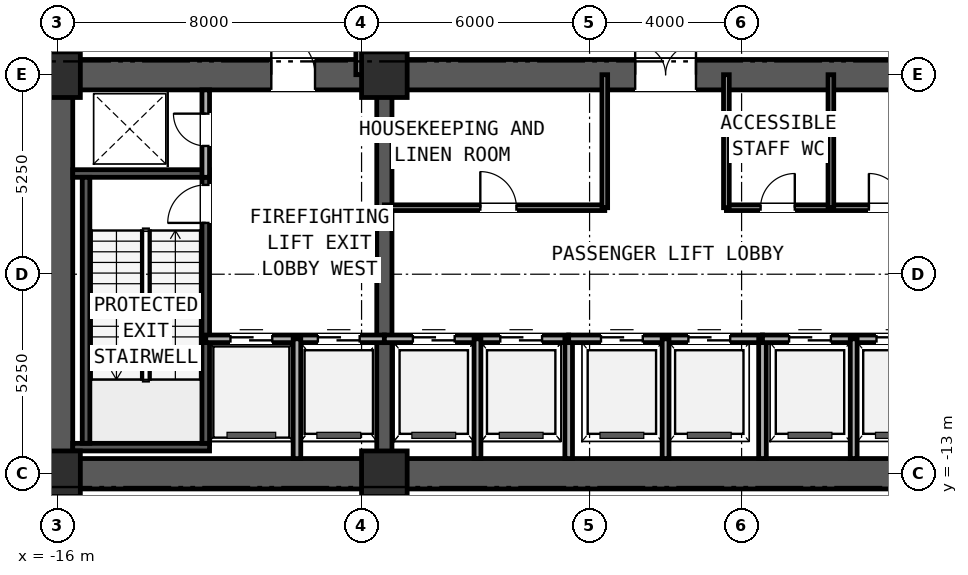
"""IFC4 building model, lengths in metres.
Left out: names, types, materials, properties, quantities, classifications, styles, units other than length and angle.
Written with IfcOpenShell. Run it as: python <this file> out.ifc"""

import sys

from ifc_helpers import new_model, si_unit, direction, frame, frame_2d, origin, origin_2d, place, context, subcontext, project, spatial, rectangle, extrude, element, fill, save


model = new_model("IFC4")
c1 = context("Model", 3, precision=1e-05, world=origin(), true_north=direction((0.0, 1.0)))
c2 = subcontext(c1, "Body", "Model", "MODEL_VIEW")
j1 = project(units=[si_unit("LENGTHUNIT", "METRE"), si_unit("PLANEANGLEUNIT", "RADIAN")], contexts=[c1])
p1 = place(None, origin())
s1 = spatial("IfcSite", under=j1, at=p1, CompositionType="ELEMENT")
p2 = place(p1, origin())
s2 = spatial("IfcBuilding", under=s1, at=p2, CompositionType="ELEMENT")
p3 = place(p2, origin())
s3 = spatial("IfcBuildingStorey", under=s2, at=p3, CompositionType="ELEMENT", Elevation=0.0)
p4 = place(p3, frame((-16.4, -13.0, 0.0), z_axis=(0.0, 0.0, 1.0), x_axis=(1.0, 0.0, 0.0)))
e1 = element("IfcWall", 1, at=p4, inside=s3, PredefinedType="SHEAR", context=c2, shape_type="SweptSolid", body=[
    extrude(rectangle(XDim=32.8, YDim=0.8, at=frame_2d((16.4, 0.0))), origin(), (0.0, 0.0, 1.0), 4.82),
])
p5 = place(p3, frame((-16.4, -2.5, 0.0), z_axis=(0.0, 0.0, 1.0), x_axis=(1.0, 0.0, 0.0)))
e2 = element("IfcWall", 2, at=p5, inside=s3, PredefinedType="SHEAR", context=c2, shape_type="SweptSolid", body=[
    extrude(rectangle(XDim=32.8, YDim=0.8, at=frame_2d((16.4, 0.0))), origin(), (0.0, 0.0, 1.0), 4.82),
])
p6 = place(p5, frame((6.025, 0.0, 0.0)))
e3 = element("IfcOpeningElement", 3, at=p6, cuts=e2, PredefinedType="OPENING", context=c2, shape_type="SweptSolid", body=[
    extrude(rectangle(XDim=1.15, YDim=2.0, at=frame_2d((0.575, 1.0))), frame((0.0, 0.41, 0.0), z_axis=(0.0, -1.0, 0.0), x_axis=(1.0, 0.0, 0.0)), (0.0, 0.0, 1.0), 0.82),
])
p7 = place(p5, frame((15.6, 0.0, 0.0)))
e4 = element("IfcOpeningElement", 4, at=p7, cuts=e2, PredefinedType="OPENING", context=c2, shape_type="SweptSolid", body=[
    extrude(rectangle(XDim=1.6, YDim=2.0, at=frame_2d((0.8, 1.0))), frame((0.0, 0.41, 0.0), z_axis=(0.0, -1.0, 0.0), x_axis=(1.0, 0.0, 0.0)), (0.0, 0.0, 1.0), 0.82),
])
p8 = place(p5, frame((25.625, 0.0, 0.0)))
e5 = element("IfcOpeningElement", 5, at=p8, cuts=e2, PredefinedType="OPENING", context=c2, shape_type="SweptSolid", body=[
    extrude(rectangle(XDim=1.15, YDim=2.0, at=frame_2d((0.575, 1.0))), frame((0.0, 0.41, 0.0), z_axis=(0.0, -1.0, 0.0), x_axis=(1.0, 0.0, 0.0)), (0.0, 0.0, 1.0), 0.82),
])
p9 = place(p3, frame((-16.0, -12.6, 0.0), z_axis=(0.0, 0.0, 1.0), x_axis=(0.0, 1.0, 0.0)))
e6 = element("IfcWall", 6, at=p9, inside=s3, PredefinedType="SHEAR", context=c2, shape_type="SweptSolid", body=[
    extrude(rectangle(XDim=9.7, YDim=0.8, at=frame_2d((4.85, 0.0))), origin(), (0.0, 0.0, 1.0), 4.82),
])
p10 = place(p3, frame((-7.4, -12.6, 0.0), z_axis=(0.0, 0.0, 1.0), x_axis=(0.0, 1.0, 0.0)))
e7 = element("IfcWall", 7, at=p10, inside=s3, PredefinedType="SHEAR", context=c2, shape_type="SweptSolid", body=[
    extrude(rectangle(XDim=9.7, YDim=0.4, at=frame_2d((4.85, 0.0))), origin(), (0.0, 0.0, 1.0), 5.1),
])
for number, where, z_axis, x_axis in (
    (8, (-15.6, -12.3, 0.0), (0.0, 0.0, 1.0), (1.0, 0.0, 0.0)),
    (9, (-15.6, -5.1, 0.0), (0.0, 0.0, 1.0), (1.0, 0.0, 0.0)),
):
    element("IfcWall", number, at=place(p3, frame(where, z_axis=z_axis, x_axis=x_axis)), inside=s3, PredefinedType="SOLIDWALL", context=c2, shape_type="SweptSolid", body=[
        extrude(rectangle(XDim=3.6, YDim=0.2, at=frame_2d((1.8, 0.0))), origin(), (0.0, 0.0, 1.0), 5.1),
    ])
p11 = place(p3, frame((-15.25, -12.2, 0.0), z_axis=(0.0, 0.0, 1.0), x_axis=(0.0, 1.0, 0.0)))
e10 = element("IfcWall", 10, at=p11, inside=s3, PredefinedType="SOLIDWALL", context=c2, shape_type="SweptSolid", body=[
    extrude(rectangle(XDim=7.0, YDim=0.2, at=frame_2d((3.5, 0.0))), origin(), (0.0, 0.0, 1.0), 5.1),
])
p12 = place(p3, frame((-12.1, -12.2, 0.0), z_axis=(0.0, 0.0, 1.0), x_axis=(0.0, 1.0, 0.0)))
e11 = element("IfcWall", 11, at=p12, inside=s3, PredefinedType="SOLIDWALL", context=c2, shape_type="SweptSolid", body=[
    extrude(rectangle(XDim=7.0, YDim=0.2, at=frame_2d((3.5, 0.0))), origin(), (0.0, 0.0, 1.0), 5.1),
])
p13 = place(p12, frame((5.8, 0.0, 0.0)))
e12 = element("IfcOpeningElement", 12, at=p13, cuts=e11, PredefinedType="OPENING", context=c2, shape_type="SweptSolid", body=[
    extrude(rectangle(XDim=1.0, YDim=2.1, at=frame_2d((0.5, 1.05))), frame((0.0, 0.11, 0.0), z_axis=(0.0, -1.0, 0.0), x_axis=(1.0, 0.0, 0.0)), (0.0, 0.0, 1.0), 0.22),
])
for number, where, z_axis, x_axis in (
    (13, (-16.0, -13.0, 0.0), (0.0, 0.0, 1.0), (1.0, 0.0, 0.0)),
    (14, (-7.4, -13.0, 0.0), (0.0, 0.0, 1.0), (1.0, 0.0, 0.0)),
    (15, (-16.0, -2.5, 0.0), (0.0, 0.0, 1.0), (1.0, 0.0, 0.0)),
    (16, (-7.4, -2.5, 0.0), (0.0, 0.0, 1.0), (1.0, 0.0, 0.0)),
):
    element("IfcColumn", number, at=place(p3, frame(where, z_axis=z_axis, x_axis=x_axis)), inside=s3, PredefinedType="COLUMN", context=c2, shape_type="SweptSolid", body=[
        extrude(rectangle(XDim=1.2, YDim=1.2, at=origin_2d()), origin(), (0.0, 0.0, 1.0), 5.4),
    ])
p14 = place(p3, frame((-12.1, -5.2, 0.0), z_axis=(0.0, 0.0, 1.0), x_axis=(0.0, 1.0, 0.0)))
e17 = element("IfcWall", 17, at=p14, inside=s3, PredefinedType="PARTITIONING", context=c2, shape_type="SweptSolid", body=[
    extrude(rectangle(XDim=2.3, YDim=0.2, at=frame_2d((1.15, 0.0))), origin(), (0.0, 0.0, 1.0), 5.1),
])
p15 = place(p14, frame((0.825, 0.0, 0.0)))
e18 = element("IfcOpeningElement", 18, at=p15, cuts=e17, PredefinedType="OPENING", context=c2, shape_type="SweptSolid", body=[
    extrude(rectangle(XDim=0.85, YDim=2.05, at=frame_2d((0.425, 1.025))), frame((0.0, 0.11, 0.0), z_axis=(0.0, -1.0, 0.0), x_axis=(1.0, 0.0, 0.0)), (0.0, 0.0, 1.0), 0.22),
])
p16 = place(p3, frame((-12.1, -9.45, 0.0), z_axis=(0.0, 0.0, 1.0), x_axis=(1.0, 0.0, 0.0)))
e19 = element("IfcWall", 19, at=p16, inside=s3, PredefinedType="PARTITIONING", context=c2, shape_type="SweptSolid", body=[
    extrude(rectangle(XDim=4.7, YDim=0.2, at=frame_2d((2.35, 0.0))), origin(), (0.0, 0.0, 1.0), 5.1),
])
p17 = place(p16, frame((0.65, 0.0, 0.0)))
e20 = element("IfcOpeningElement", 20, at=p17, cuts=e19, PredefinedType="OPENING", context=c2, shape_type="SweptSolid", body=[
    extrude(rectangle(XDim=1.1, YDim=2.2, at=frame_2d((0.55, 1.1))), frame((0.0, 0.11, 0.0), z_axis=(0.0, -1.0, 0.0), x_axis=(1.0, 0.0, 0.0)), (0.0, 0.0, 1.0), 0.22),
])
p18 = place(p16, frame((2.95, 0.0, 0.0)))
e21 = element("IfcOpeningElement", 21, at=p18, cuts=e19, PredefinedType="OPENING", context=c2, shape_type="SweptSolid", body=[
    extrude(rectangle(XDim=1.1, YDim=2.2, at=frame_2d((0.55, 1.1))), frame((0.0, 0.11, 0.0), z_axis=(0.0, -1.0, 0.0), x_axis=(1.0, 0.0, 0.0)), (0.0, 0.0, 1.0), 0.22),
])
p19 = place(p3, frame((-9.7, -12.6, 0.0), z_axis=(0.0, 0.0, 1.0), x_axis=(0.0, 1.0, 0.0)))
e22 = element("IfcWall", 22, at=p19, inside=s3, PredefinedType="PARTITIONING", context=c2, shape_type="SweptSolid", body=[
    extrude(rectangle(XDim=3.15, YDim=0.2, at=frame_2d((1.575, 0.0))), origin(), (0.0, 0.0, 1.0), 5.1),
])
p20 = place(p3, frame((-7.4, -9.45, 0.0), z_axis=(0.0, 0.0, 1.0), x_axis=(1.0, 0.0, 0.0)))
e23 = element("IfcWall", 23, at=p20, inside=s3, PredefinedType="PARTITIONING", context=c2, shape_type="SweptSolid", body=[
    extrude(rectangle(XDim=4.85, YDim=0.2, at=frame_2d((2.425, 0.0))), origin(), (0.0, 0.0, 1.0), 5.1),
])
p21 = place(p20, frame((0.75, 0.0, 0.0)))
e24 = element("IfcOpeningElement", 24, at=p21, cuts=e23, PredefinedType="OPENING", context=c2, shape_type="SweptSolid", body=[
    extrude(rectangle(XDim=1.1, YDim=2.2, at=frame_2d((0.55, 1.1))), frame((0.0, 0.11, 0.0), z_axis=(0.0, -1.0, 0.0), x_axis=(1.0, 0.0, 0.0)), (0.0, 0.0, 1.0), 0.22),
])
p22 = place(p20, frame((3.05, 0.0, 0.0)))
e25 = element("IfcOpeningElement", 25, at=p22, cuts=e23, PredefinedType="OPENING", context=c2, shape_type="SweptSolid", body=[
    extrude(rectangle(XDim=1.1, YDim=2.2, at=frame_2d((0.55, 1.1))), frame((0.0, 0.11, 0.0), z_axis=(0.0, -1.0, 0.0), x_axis=(1.0, 0.0, 0.0)), (0.0, 0.0, 1.0), 0.22),
])
p23 = place(p3, frame((-4.95, -12.6, 0.0), z_axis=(0.0, 0.0, 1.0), x_axis=(0.0, 1.0, 0.0)))
e26 = element("IfcWall", 26, at=p23, inside=s3, PredefinedType="PARTITIONING", context=c2, shape_type="SweptSolid", body=[
    extrude(rectangle(XDim=3.15, YDim=0.18, at=frame_2d((1.575, 0.0))), origin(), (0.0, 0.0, 1.0), 5.1),
])
p24 = place(p3, frame((-2.55, -12.6, 0.0), z_axis=(0.0, 0.0, 1.0), x_axis=(0.0, 1.0, 0.0)))
e27 = element("IfcWall", 27, at=p24, inside=s3, PredefinedType="PARTITIONING", context=c2, shape_type="SweptSolid", body=[
    extrude(rectangle(XDim=3.15, YDim=0.2, at=frame_2d((1.575, 0.0))), origin(), (0.0, 0.0, 1.0), 5.1),
])
p25 = place(p3, frame((-2.55, -9.45, 0.0), z_axis=(0.0, 0.0, 1.0), x_axis=(1.0, 0.0, 0.0)))
e28 = element("IfcWall", 28, at=p25, inside=s3, PredefinedType="PARTITIONING", context=c2, shape_type="SweptSolid", body=[
    extrude(rectangle(XDim=5.1, YDim=0.2, at=frame_2d((2.55, 0.0))), origin(), (0.0, 0.0, 1.0), 5.1),
])
p26 = place(p25, frame((0.85, 0.0, 0.0)))
e29 = element("IfcOpeningElement", 29, at=p26, cuts=e28, PredefinedType="OPENING", context=c2, shape_type="SweptSolid", body=[
    extrude(rectangle(XDim=1.1, YDim=2.2, at=frame_2d((0.55, 1.1))), frame((0.0, 0.11, 0.0), z_axis=(0.0, -1.0, 0.0), x_axis=(1.0, 0.0, 0.0)), (0.0, 0.0, 1.0), 0.22),
])
p27 = place(p25, frame((3.15, 0.0, 0.0)))
e30 = element("IfcOpeningElement", 30, at=p27, cuts=e28, PredefinedType="OPENING", context=c2, shape_type="SweptSolid", body=[
    extrude(rectangle(XDim=1.1, YDim=2.2, at=frame_2d((0.55, 1.1))), frame((0.0, 0.11, 0.0), z_axis=(0.0, -1.0, 0.0), x_axis=(1.0, 0.0, 0.0)), (0.0, 0.0, 1.0), 0.22),
])
p28 = place(p3, frame((0.0, -12.6, 0.0), z_axis=(0.0, 0.0, 1.0), x_axis=(0.0, 1.0, 0.0)))
e31 = element("IfcWall", 31, at=p28, inside=s3, PredefinedType="PARTITIONING", context=c2, shape_type="SweptSolid", body=[
    extrude(rectangle(XDim=3.15, YDim=0.18, at=frame_2d((1.575, 0.0))), origin(), (0.0, 0.0, 1.0), 5.1),
])
p29 = place(p3, frame((2.55, -12.6, 0.0), z_axis=(0.0, 0.0, 1.0), x_axis=(0.0, 1.0, 0.0)))
e32 = element("IfcWall", 32, at=p29, inside=s3, PredefinedType="PARTITIONING", context=c2, shape_type="SweptSolid", body=[
    extrude(rectangle(XDim=3.15, YDim=0.2, at=frame_2d((1.575, 0.0))), origin(), (0.0, 0.0, 1.0), 5.1),
])
p30 = place(p3, frame((2.55, -9.45, 0.0), z_axis=(0.0, 0.0, 1.0), x_axis=(1.0, 0.0, 0.0)))
e33 = element("IfcWall", 33, at=p30, inside=s3, PredefinedType="PARTITIONING", context=c2, shape_type="SweptSolid", body=[
    extrude(rectangle(XDim=4.85, YDim=0.2, at=frame_2d((2.425, 0.0))), origin(), (0.0, 0.0, 1.0), 5.1),
])
p31 = place(p30, frame((0.7, 0.0, 0.0)))
e34 = element("IfcOpeningElement", 34, at=p31, cuts=e33, PredefinedType="OPENING", context=c2, shape_type="SweptSolid", body=[
    extrude(rectangle(XDim=1.1, YDim=2.2, at=frame_2d((0.55, 1.1))), frame((0.0, 0.11, 0.0), z_axis=(0.0, -1.0, 0.0), x_axis=(1.0, 0.0, 0.0)), (0.0, 0.0, 1.0), 0.22),
])
p32 = place(p30, frame((3.0, 0.0, 0.0)))
e35 = element("IfcOpeningElement", 35, at=p32, cuts=e33, PredefinedType="OPENING", context=c2, shape_type="SweptSolid", body=[
    extrude(rectangle(XDim=1.1, YDim=2.2, at=frame_2d((0.55, 1.1))), frame((0.0, 0.11, 0.0), z_axis=(0.0, -1.0, 0.0), x_axis=(1.0, 0.0, 0.0)), (0.0, 0.0, 1.0), 0.22),
])
p33 = place(p3, frame((4.95, -12.6, 0.0), z_axis=(0.0, 0.0, 1.0), x_axis=(0.0, 1.0, 0.0)))
e36 = element("IfcWall", 36, at=p33, inside=s3, PredefinedType="PARTITIONING", context=c2, shape_type="SweptSolid", body=[
    extrude(rectangle(XDim=3.15, YDim=0.18, at=frame_2d((1.575, 0.0))), origin(), (0.0, 0.0, 1.0), 5.1),
])
p34 = place(p3, frame((-7.4, -6.0, 0.0), z_axis=(0.0, 0.0, 1.0), x_axis=(1.0, 0.0, 0.0)))
e37 = element("IfcWall", 37, at=p34, inside=s3, PredefinedType="PARTITIONING", context=c2, shape_type="SweptSolid", body=[
    extrude(rectangle(XDim=5.8, YDim=0.15, at=frame_2d((2.9, 0.0))), origin(), (0.0, 0.0, 1.0), 5.1),
])
p35 = place(p34, frame((2.525, 0.0, 0.0)))
e38 = element("IfcOpeningElement", 38, at=p35, cuts=e37, PredefinedType="OPENING", context=c2, shape_type="SweptSolid", body=[
    extrude(rectangle(XDim=0.95, YDim=2.15, at=frame_2d((0.475, 1.075))), frame((0.0, 0.085, 0.0), z_axis=(0.0, -1.0, 0.0), x_axis=(1.0, 0.0, 0.0)), (0.0, 0.0, 1.0), 0.17),
])
p36 = place(p3, frame((-1.6, -6.0, 0.0), z_axis=(0.0, 0.0, 1.0), x_axis=(0.0, 1.0, 0.0)))
e39 = element("IfcWall", 39, at=p36, inside=s3, PredefinedType="PARTITIONING", context=c2, shape_type="SweptSolid", body=[
    extrude(rectangle(XDim=3.5, YDim=0.15, at=frame_2d((1.75, 0.0))), origin(), (0.0, 0.0, 1.0), 4.229),
])
p37 = place(p3, frame((1.6, -6.0, 0.0), z_axis=(0.0, 0.0, 1.0), x_axis=(1.0, 0.0, 0.0)))
e40 = element("IfcWall", 40, at=p37, inside=s3, PredefinedType="PARTITIONING", context=c2, shape_type="SweptSolid", body=[
    extrude(rectangle(XDim=5.8, YDim=0.15, at=frame_2d((2.9, 0.0))), origin(), (0.0, 0.0, 1.0), 5.1),
])
p38 = place(p37, frame((0.9, 0.0, 0.0)))
e41 = element("IfcOpeningElement", 41, at=p38, cuts=e40, PredefinedType="OPENING", context=c2, shape_type="SweptSolid", body=[
    extrude(rectangle(XDim=0.9, YDim=2.1, at=frame_2d((0.45, 1.05))), frame((0.0, 0.085, 0.0), z_axis=(0.0, -1.0, 0.0), x_axis=(1.0, 0.0, 0.0)), (0.0, 0.0, 1.0), 0.17),
])
p39 = place(p37, frame((3.75, 0.0, 0.0)))
e42 = element("IfcOpeningElement", 42, at=p39, cuts=e40, PredefinedType="OPENING", context=c2, shape_type="SweptSolid", body=[
    extrude(rectangle(XDim=0.9, YDim=2.1, at=frame_2d((0.45, 1.05))), frame((0.0, 0.085, 0.0), z_axis=(0.0, -1.0, 0.0), x_axis=(1.0, 0.0, 0.0)), (0.0, 0.0, 1.0), 0.17),
])
for number, where, z_axis, x_axis in (
    (43, (1.6, -6.0, 0.0), (0.0, 0.0, 1.0), (0.0, 1.0, 0.0)),
    (44, (4.35, -6.0, 0.0), (0.0, 0.0, 1.0), (0.0, 1.0, 0.0)),
):
    element("IfcWall", number, at=place(p3, frame(where, z_axis=z_axis, x_axis=x_axis)), inside=s3, PredefinedType="PARTITIONING", context=c2, shape_type="SweptSolid", body=[
        extrude(rectangle(XDim=3.5, YDim=0.15, at=frame_2d((1.75, 0.0))), origin(), (0.0, 0.0, 1.0), 4.229),
    ])
p40 = place(p3, frame((-8.05, -2.5, 0.0), z_axis=(0.0, 0.0, 1.0), x_axis=(0.0, 1.0, 0.0)))
e45 = element("IfcWall", 45, at=p40, inside=s3, PredefinedType="PARTITIONING", context=c2, shape_type="SweptSolid", body=[
    extrude(rectangle(XDim=2.2, YDim=0.2, at=frame_2d((1.1, 0.0))), origin(), (0.0, 0.0, 1.0), 4.312),
])
p41 = place(p3, frame((-7.5, -23.36, 0.0), z_axis=(0.0, 0.0, 1.0), x_axis=(0.0, 1.0, 0.0)))
e46 = element("IfcWall", 46, at=p41, inside=s3, PredefinedType="PARTITIONING", context=c2, shape_type="SweptSolid", body=[
    extrude(rectangle(XDim=10.01, YDim=0.2, at=frame_2d((5.005, 0.0))), origin(), (0.0, 0.0, 1.0), 4.229),
])
p42 = place(p41, frame((7.66, 0.0, 0.0)))
e47 = element("IfcOpeningElement", 47, at=p42, cuts=e46, PredefinedType="OPENING", context=c2, shape_type="SweptSolid", body=[
    extrude(rectangle(XDim=1.0, YDim=2.1, at=frame_2d((0.5, 1.05))), frame((0.0, 0.11, 0.0), z_axis=(0.0, -1.0, 0.0), x_axis=(1.0, 0.0, 0.0)), (0.0, 0.0, 1.0), 0.22),
])
p43 = place(p13, frame((1.0, 0.0, 0.0), z_axis=(0.0, 0.0, 1.0), x_axis=(-1.0, 0.0, 0.0)))
e48 = element("IfcDoor", 48, at=p43, inside=s3, OperationType="SINGLE_SWING_LEFT", PredefinedType="DOOR", context=c2, shape_type="SweptSolid", body=[
    extrude(rectangle(XDim=1.0, YDim=2.1, at=frame_2d((0.5, 1.05))), frame((0.0, 0.025, 0.0), z_axis=(0.0, -1.0, 0.0), x_axis=(1.0, 0.0, 0.0)), (0.0, 0.0, 1.0), 0.05),
])
fill(e12, e48)
p44 = place(p15, origin())
e49 = element("IfcDoor", 49, at=p44, inside=s3, OperationType="SINGLE_SWING_RIGHT", PredefinedType="DOOR", context=c2, shape_type="SweptSolid", body=[
    extrude(rectangle(XDim=0.85, YDim=2.05, at=frame_2d((0.425, 1.025))), frame((0.0, 0.025, 0.0), z_axis=(0.0, -1.0, 0.0), x_axis=(1.0, 0.0, 0.0)), (0.0, 0.0, 1.0), 0.05),
])
fill(e18, e49)
p45 = place(p17, origin())
e50 = element("IfcDoor", 50, at=p45, inside=s3, OperationType="SLIDING_TO_LEFT", PredefinedType="DOOR", context=c2, shape_type="SweptSolid", body=[
    extrude(rectangle(XDim=1.1, YDim=2.2, at=frame_2d((0.55, 1.1))), frame((0.0, 0.025, 0.0), z_axis=(0.0, -1.0, 0.0), x_axis=(1.0, 0.0, 0.0)), (0.0, 0.0, 1.0), 0.05),
])
fill(e20, e50)
p46 = place(p18, origin())
e51 = element("IfcDoor", 51, at=p46, inside=s3, OperationType="SLIDING_TO_RIGHT", PredefinedType="DOOR", context=c2, shape_type="SweptSolid", body=[
    extrude(rectangle(XDim=1.1, YDim=2.2, at=frame_2d((0.55, 1.1))), frame((0.0, 0.025, 0.0), z_axis=(0.0, -1.0, 0.0), x_axis=(1.0, 0.0, 0.0)), (0.0, 0.0, 1.0), 0.05),
])
fill(e21, e51)
p47 = place(p6, origin())
e52 = element("IfcDoor", 52, at=p47, inside=s3, OperationType="SINGLE_SWING_LEFT", PredefinedType="DOOR", context=c2, shape_type="SweptSolid", body=[
    extrude(rectangle(XDim=1.15, YDim=2.0, at=frame_2d((0.575, 1.0))), frame((0.0, 0.025, 0.0), z_axis=(0.0, -1.0, 0.0), x_axis=(1.0, 0.0, 0.0)), (0.0, 0.0, 1.0), 0.05),
])
fill(e3, e52)
p48 = place(p7, origin())
e53 = element("IfcDoor", 53, at=p48, inside=s3, OperationType="DOUBLE_DOOR_SINGLE_SWING", PredefinedType="DOOR", context=c2, shape_type="SweptSolid", body=[
    extrude(rectangle(XDim=1.6, YDim=2.0, at=frame_2d((0.8, 1.0))), frame((0.0, 0.025, 0.0), z_axis=(0.0, -1.0, 0.0), x_axis=(1.0, 0.0, 0.0)), (0.0, 0.0, 1.0), 0.05),
])
fill(e4, e53)
p49 = place(p21, origin())
e54 = element("IfcDoor", 54, at=p49, inside=s3, OperationType="SLIDING_TO_LEFT", PredefinedType="DOOR", context=c2, shape_type="SweptSolid", body=[
    extrude(rectangle(XDim=1.1, YDim=2.2, at=frame_2d((0.55, 1.1))), frame((0.0, 0.025, 0.0), z_axis=(0.0, -1.0, 0.0), x_axis=(1.0, 0.0, 0.0)), (0.0, 0.0, 1.0), 0.05),
])
fill(e24, e54)
p50 = place(p22, origin())
e55 = element("IfcDoor", 55, at=p50, inside=s3, OperationType="SLIDING_TO_LEFT", PredefinedType="DOOR", context=c2, shape_type="SweptSolid", body=[
    extrude(rectangle(XDim=1.1, YDim=2.2, at=frame_2d((0.55, 1.1))), frame((0.0, 0.025, 0.0), z_axis=(0.0, -1.0, 0.0), x_axis=(1.0, 0.0, 0.0)), (0.0, 0.0, 1.0), 0.05),
])
fill(e25, e55)
p51 = place(p26, origin())
e56 = element("IfcDoor", 56, at=p51, inside=s3, OperationType="SLIDING_TO_RIGHT", PredefinedType="DOOR", context=c2, shape_type="SweptSolid", body=[
    extrude(rectangle(XDim=1.1, YDim=2.2, at=frame_2d((0.55, 1.1))), frame((0.0, 0.025, 0.0), z_axis=(0.0, -1.0, 0.0), x_axis=(1.0, 0.0, 0.0)), (0.0, 0.0, 1.0), 0.05),
])
fill(e29, e56)
p52 = place(p27, origin())
e57 = element("IfcDoor", 57, at=p52, inside=s3, OperationType="SLIDING_TO_RIGHT", PredefinedType="DOOR", context=c2, shape_type="SweptSolid", body=[
    extrude(rectangle(XDim=1.1, YDim=2.2, at=frame_2d((0.55, 1.1))), frame((0.0, 0.025, 0.0), z_axis=(0.0, -1.0, 0.0), x_axis=(1.0, 0.0, 0.0)), (0.0, 0.0, 1.0), 0.05),
])
fill(e30, e57)
p53 = place(p31, origin())
e58 = element("IfcDoor", 58, at=p53, inside=s3, OperationType="SLIDING_TO_LEFT", PredefinedType="DOOR", context=c2, shape_type="SweptSolid", body=[
    extrude(rectangle(XDim=1.1, YDim=2.2, at=frame_2d((0.55, 1.1))), frame((0.0, 0.025, 0.0), z_axis=(0.0, -1.0, 0.0), x_axis=(1.0, 0.0, 0.0)), (0.0, 0.0, 1.0), 0.05),
])
fill(e34, e58)
p54 = place(p32, origin())
e59 = element("IfcDoor", 59, at=p54, inside=s3, OperationType="SLIDING_TO_LEFT", PredefinedType="DOOR", context=c2, shape_type="SweptSolid", body=[
    extrude(rectangle(XDim=1.1, YDim=2.2, at=frame_2d((0.55, 1.1))), frame((0.0, 0.025, 0.0), z_axis=(0.0, -1.0, 0.0), x_axis=(1.0, 0.0, 0.0)), (0.0, 0.0, 1.0), 0.05),
])
fill(e35, e59)
p55 = place(p35, frame((0.95, 0.0, 0.0), z_axis=(0.0, 0.0, 1.0), x_axis=(-1.0, 0.0, 0.0)))
e60 = element("IfcDoor", 60, at=p55, inside=s3, OperationType="SINGLE_SWING_LEFT", PredefinedType="DOOR", context=c2, shape_type="SweptSolid", body=[
    extrude(rectangle(XDim=0.95, YDim=2.15, at=frame_2d((0.475, 1.075))), frame((0.0, 0.025, 0.0), z_axis=(0.0, -1.0, 0.0), x_axis=(1.0, 0.0, 0.0)), (0.0, 0.0, 1.0), 0.05),
])
fill(e38, e60)
p56 = place(p38, frame((0.9, 0.0, 0.0), z_axis=(0.0, 0.0, 1.0), x_axis=(-1.0, 0.0, 0.0)))
e61 = element("IfcDoor", 61, at=p56, inside=s3, OperationType="SINGLE_SWING_RIGHT", PredefinedType="DOOR", context=c2, shape_type="SweptSolid", body=[
    extrude(rectangle(XDim=0.9, YDim=2.1, at=frame_2d((0.45, 1.05))), frame((0.0, 0.025, 0.0), z_axis=(0.0, -1.0, 0.0), x_axis=(1.0, 0.0, 0.0)), (0.0, 0.0, 1.0), 0.05),
])
fill(e41, e61)
p57 = place(p39, frame((0.9, 0.0, 0.0), z_axis=(0.0, 0.0, 1.0), x_axis=(-1.0, 0.0, 0.0)))
e62 = element("IfcDoor", 62, at=p57, inside=s3, OperationType="SINGLE_SWING_LEFT", PredefinedType="DOOR", context=c2, shape_type="SweptSolid", body=[
    extrude(rectangle(XDim=0.9, YDim=2.1, at=frame_2d((0.45, 1.05))), frame((0.0, 0.025, 0.0), z_axis=(0.0, -1.0, 0.0), x_axis=(1.0, 0.0, 0.0)), (0.0, 0.0, 1.0), 0.05),
])
fill(e42, e62)
save(model, sys.argv[1])
